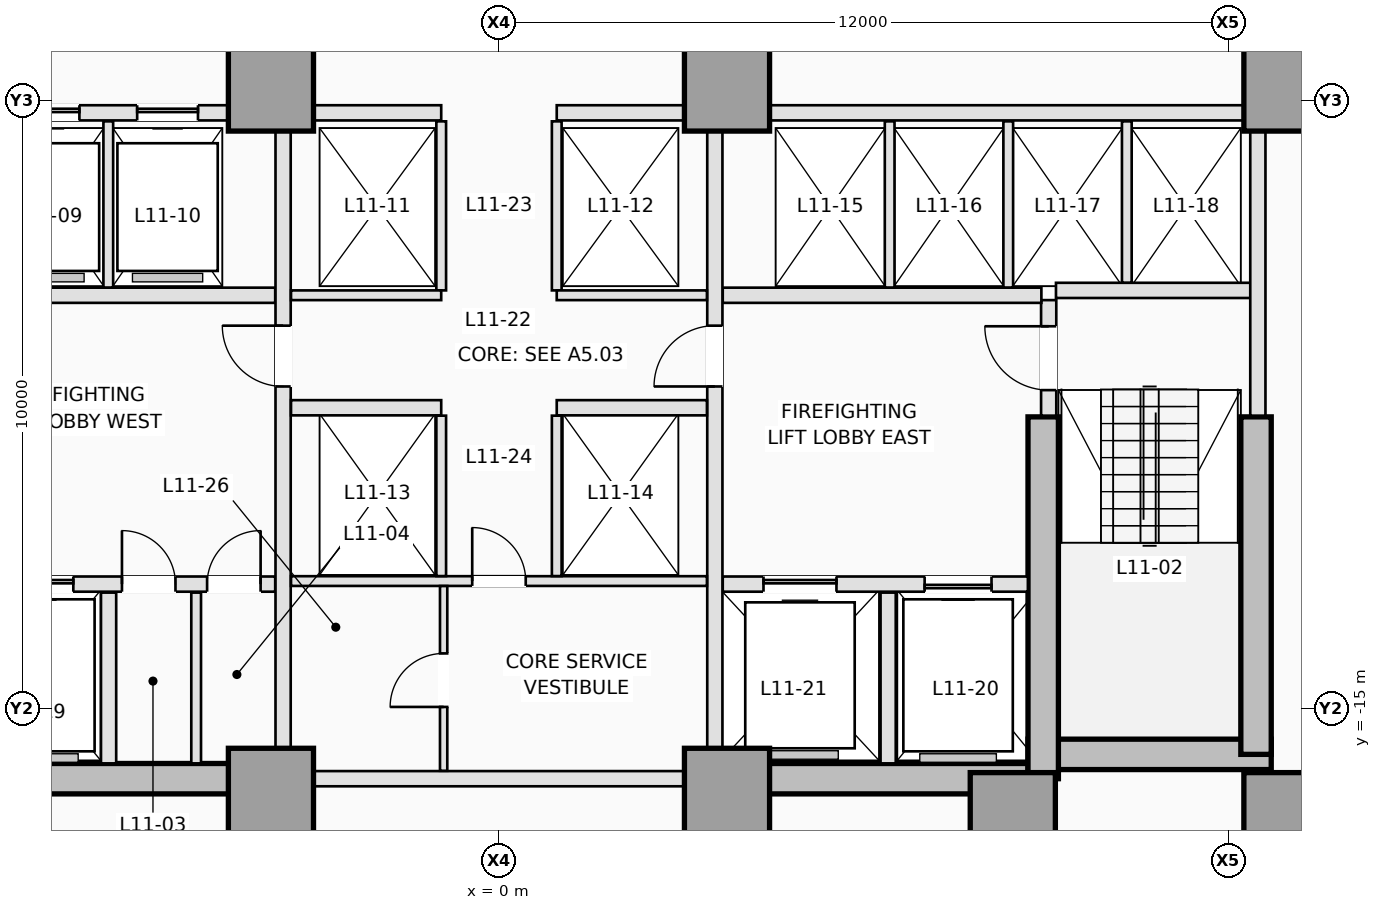
"""IFC4 building model, lengths in metres.
Left out: names, types, materials, properties, quantities, classifications, styles, units other than length and angle.
Written with IfcOpenShell. Run it as: python <this file> out.ifc"""

import sys

from ifc_helpers import new_model, si_unit, direction, frame, frame_2d, origin, origin_2d, place, context, subcontext, project, spatial, rectangle, extrude, element, fill, save


model = new_model("IFC4")
c1 = context("Model", 3, precision=1e-05, world=origin(), true_north=direction((0.0, 1.0)))
c2 = subcontext(c1, "Body", "Model", "MODEL_VIEW")
j1 = project(units=[si_unit("LENGTHUNIT", "METRE"), si_unit("PLANEANGLEUNIT", "RADIAN")], contexts=[c1])
p1 = place(None, origin())
s1 = spatial("IfcSite", under=j1, at=p1, CompositionType="ELEMENT")
p2 = place(p1, origin())
s2 = spatial("IfcBuilding", under=s1, at=p2, CompositionType="ELEMENT")
p3 = place(p2, frame((0.0, 0.0, 45.1)))
s3 = spatial("IfcBuildingStorey", under=s2, at=p3, CompositionType="ELEMENT", Elevation=45.1)
for number, where, z_axis, x_axis in (
    (1, (-8.95, -16.15, 0.0), (0.0, 0.0, 1.0), (1.0, 0.0, 0.0)),
    (2, (3.75, -16.15, 0.0), (0.0, 0.0, 1.0), (1.0, 0.0, 0.0)),
):
    element("IfcWall", number, at=place(p3, frame(where, z_axis=z_axis, x_axis=x_axis)), inside=s3, PredefinedType="SHEAR", context=c2, shape_type="SweptSolid", body=[
        extrude(rectangle(XDim=5.2, YDim=0.5, at=frame_2d((2.6, 0.0))), origin(), (0.0, 0.0, 1.0), 3.5),
    ])
p4 = place(p3, frame((8.7, -15.75, 0.0), z_axis=(0.0, 0.0, 1.0), x_axis=(1.0, 0.0, 0.0)))
e3 = element("IfcWall", 3, at=p4, inside=s3, PredefinedType="SHEAR", context=c2, shape_type="SweptSolid", body=[
    extrude(rectangle(XDim=4.0, YDim=0.5, at=frame_2d((2.0, 0.0))), origin(), (0.0, 0.0, 1.0), 3.5),
])
p5 = place(p3, frame((12.45, -15.75, 0.0), z_axis=(0.0, 0.0, 1.0), x_axis=(0.0, 1.0, 0.0)))
e4 = element("IfcWall", 4, at=p5, inside=s3, PredefinedType="SHEAR", context=c2, shape_type="SweptSolid", body=[
    extrude(rectangle(XDim=5.55, YDim=0.5, at=frame_2d((2.775, 0.0))), origin(), (0.0, 0.0, 1.0), 3.5),
])
p6 = place(p3, frame((8.95, -16.15, 0.0), z_axis=(0.0, 0.0, 1.0), x_axis=(0.0, 1.0, 0.0)))
e5 = element("IfcWall", 5, at=p6, inside=s3, PredefinedType="SHEAR", context=c2, shape_type="SweptSolid", body=[
    extrude(rectangle(XDim=5.95, YDim=0.5, at=frame_2d((2.975, 0.0))), origin(), (0.0, 0.0, 1.0), 3.5),
])
for number, where, z_axis, x_axis in (
    (6, (-3.75, -16.35, 0.0), (0.0, 0.0, 1.0), (1.0, 0.0, 0.0)),
    (7, (3.75, -16.35, 0.0), (0.0, 0.0, 1.0), (1.0, 0.0, 0.0)),
    (8, (8.45, -16.75, 0.0), (0.0, 0.0, 1.0), (1.0, 0.0, 0.0)),
    (9, (12.95, -16.75, 0.0), (0.0, 0.0, 1.0), (1.0, 0.0, 0.0)),
    (10, (-3.75, -4.8, 0.0), (0.0, 0.0, 1.0), (1.0, 0.0, 0.0)),
    (11, (3.75, -4.8, 0.0), (0.0, 0.0, 1.0), (1.0, 0.0, 0.0)),
    (12, (12.95, -4.8, 0.0), (0.0, 0.0, 1.0), (1.0, 0.0, 0.0)),
):
    element("IfcColumn", number, at=place(p3, frame(where, z_axis=z_axis, x_axis=x_axis)), inside=s3, PredefinedType="COLUMN", context=c2, shape_type="SweptSolid", body=[
        extrude(rectangle(XDim=1.4, YDim=1.4, at=origin_2d()), origin(), (0.0, 0.0, 1.0), 3.5),
    ])
p7 = place(p3, frame((9.04, -10.18, 0.0), z_axis=(0.0, 0.0, 1.0), x_axis=(0.0, 1.0, 0.0)))
e13 = element("IfcWall", 13, at=p7, inside=s3, PredefinedType="PARTITIONING", context=c2, shape_type="SweptSolid", body=[
    extrude(rectangle(XDim=1.9, YDim=0.25, at=frame_2d((0.95, 0.0))), origin(), (0.0, 0.0, 1.0), 3.25),
])
p8 = place(p7, frame((0.42, 0.0, 0.0)))
e14 = element("IfcOpeningElement", 14, at=p8, cuts=e13, PredefinedType="OPENING", context=c2, shape_type="SweptSolid", body=[
    extrude(rectangle(XDim=1.05, YDim=2.15, at=frame_2d((0.525, 1.075))), frame((0.0, 0.135, 0.0), z_axis=(0.0, -1.0, 0.0), x_axis=(1.0, 0.0, 0.0)), (0.0, 0.0, 1.0), 0.27),
])
p9 = place(p3, frame((9.16, -8.12, 0.0), z_axis=(0.0, 0.0, 1.0), x_axis=(1.0, 0.0, 0.0)))
e15 = element("IfcWall", 15, at=p9, inside=s3, PredefinedType="PARTITIONING", context=c2, shape_type="SweptSolid", body=[
    extrude(rectangle(XDim=3.22, YDim=0.25, at=frame_2d((1.61, 0.0))), origin(), (0.0, 0.0, 1.0), 3.25),
])
p10 = place(p3, frame((12.48, -10.18, 0.0), z_axis=(0.0, 0.0, 1.0), x_axis=(0.0, 1.0, 0.0)))
e16 = element("IfcWall", 16, at=p10, inside=s3, PredefinedType="PARTITIONING", context=c2, shape_type="SweptSolid", body=[
    extrude(rectangle(XDim=4.678, YDim=0.25, at=frame_2d((2.339, 0.0))), origin(), (0.0, 0.0, 1.0), 3.25),
])
p11 = place(p3, frame((-8.698, -12.95, 0.0), z_axis=(0.0, 0.0, 1.0), x_axis=(1.0, 0.0, 0.0)))
e17 = element("IfcWall", 17, at=p11, inside=s3, PredefinedType="PARTITIONING", context=c2, shape_type="SweptSolid", body=[
    extrude(rectangle(XDim=5.018, YDim=0.25, at=frame_2d((2.509, 0.0))), origin(), (0.0, 0.0, 1.0), 3.25),
])
p12 = place(p11, frame((0.598, 0.0, 0.0)))
e18 = element("IfcOpeningElement", 18, at=p12, cuts=e17, PredefinedType="OPENING", context=c2, shape_type="SweptSolid", body=[
    extrude(rectangle(XDim=1.1, YDim=2.15, at=frame_2d((0.55, 1.075))), frame((0.0, 0.135, 0.0), z_axis=(0.0, -1.0, 0.0), x_axis=(1.0, 0.0, 0.0)), (0.0, 0.0, 1.0), 0.27),
])
p13 = place(p11, frame((2.498, 0.0, 0.0)))
e19 = element("IfcOpeningElement", 19, at=p13, cuts=e17, PredefinedType="OPENING", context=c2, shape_type="SweptSolid", body=[
    extrude(rectangle(XDim=0.88, YDim=2.1, at=frame_2d((0.44, 1.05))), frame((0.0, 0.135, 0.0), z_axis=(0.0, -1.0, 0.0), x_axis=(1.0, 0.0, 0.0)), (0.0, 0.0, 1.0), 0.27),
])
p14 = place(p11, frame((3.898, 0.0, 0.0)))
e20 = element("IfcOpeningElement", 20, at=p14, cuts=e17, PredefinedType="OPENING", context=c2, shape_type="SweptSolid", body=[
    extrude(rectangle(XDim=0.88, YDim=2.1, at=frame_2d((0.44, 1.05))), frame((0.0, 0.135, 0.0), z_axis=(0.0, -1.0, 0.0), x_axis=(1.0, 0.0, 0.0)), (0.0, 0.0, 1.0), 0.27),
])
p15 = place(p3, frame((3.68, -12.95, 0.0), z_axis=(0.0, 0.0, 1.0), x_axis=(1.0, 0.0, 0.0)))
e21 = element("IfcWall", 21, at=p15, inside=s3, PredefinedType="PARTITIONING", context=c2, shape_type="SweptSolid", body=[
    extrude(rectangle(XDim=5.018, YDim=0.25, at=frame_2d((2.509, 0.0))), origin(), (0.0, 0.0, 1.0), 3.25),
])
p16 = place(p15, frame((3.32, 0.0, 0.0)))
e22 = element("IfcOpeningElement", 22, at=p16, cuts=e21, PredefinedType="OPENING", context=c2, shape_type="SweptSolid", body=[
    extrude(rectangle(XDim=1.1, YDim=2.15, at=frame_2d((0.55, 1.075))), frame((0.0, 0.135, 0.0), z_axis=(0.0, -1.0, 0.0), x_axis=(1.0, 0.0, 0.0)), (0.0, 0.0, 1.0), 0.27),
])
p17 = place(p15, frame((0.67, 0.0, 0.0)))
e23 = element("IfcOpeningElement", 23, at=p17, cuts=e21, PredefinedType="OPENING", context=c2, shape_type="SweptSolid", body=[
    extrude(rectangle(XDim=1.2, YDim=2.15, at=frame_2d((0.6, 1.075))), frame((0.0, 0.135, 0.0), z_axis=(0.0, -1.0, 0.0), x_axis=(1.0, 0.0, 0.0)), (0.0, 0.0, 1.0), 0.27),
])
p18 = place(p3, frame((-6.42, -15.898, 0.0), z_axis=(0.0, 0.0, 1.0), x_axis=(0.0, 1.0, 0.0)))
e24 = element("IfcWall", 24, at=p18, inside=s3, PredefinedType="PARTITIONING", context=c2, shape_type="SweptSolid", body=[
    extrude(rectangle(XDim=2.808, YDim=0.25, at=frame_2d((1.404, 0.0))), origin(), (0.0, 0.0, 1.0), 3.25),
])
p19 = place(p3, frame((-4.98, -15.898, 0.0), z_axis=(0.0, 0.0, 1.0), x_axis=(0.0, 1.0, 0.0)))
e25 = element("IfcWall", 25, at=p19, inside=s3, PredefinedType="PARTITIONING", context=c2, shape_type="SweptSolid", body=[
    extrude(rectangle(XDim=2.808, YDim=0.16, at=frame_2d((1.404, 0.0))), origin(), (0.0, 0.0, 1.0), 3.25),
])
p20 = place(p3, frame((6.4, -15.898, 0.0), z_axis=(0.0, 0.0, 1.0), x_axis=(0.0, 1.0, 0.0)))
e26 = element("IfcWall", 26, at=p20, inside=s3, PredefinedType="PARTITIONING", context=c2, shape_type="SweptSolid", body=[
    extrude(rectangle(XDim=2.808, YDim=0.25, at=frame_2d((1.404, 0.0))), origin(), (0.0, 0.0, 1.0), 3.25),
])
for number, where, z_axis, x_axis in (
    (27, (-8.92, -8.2, 0.0), (0.0, 0.0, 1.0), (1.0, 0.0, 0.0)),
    (28, (3.68, -8.2, 0.0), (0.0, 0.0, 1.0), (1.0, 0.0, 0.0)),
):
    element("IfcWall", number, at=place(p3, frame(where, z_axis=z_axis, x_axis=x_axis)), inside=s3, PredefinedType="PARTITIONING", context=c2, shape_type="SweptSolid", body=[
        extrude(rectangle(XDim=5.24, YDim=0.25, at=frame_2d((2.62, 0.0))), origin(), (0.0, 0.0, 1.0), 3.25),
    ])
p21 = place(p3, frame((-3.55, -15.648, 0.0), z_axis=(0.0, 0.0, 1.0), x_axis=(0.0, 1.0, 0.0)))
e29 = element("IfcWall", 29, at=p21, inside=s3, PredefinedType="PARTITIONING", context=c2, shape_type="SweptSolid", body=[
    extrude(rectangle(XDim=10.146, YDim=0.25, at=frame_2d((5.073, 0.0))), origin(), (0.0, 0.0, 1.0), 3.25),
])
p22 = place(p21, frame((5.948, 0.0, 0.0)))
e30 = element("IfcOpeningElement", 30, at=p22, cuts=e29, PredefinedType="OPENING", context=c2, shape_type="SweptSolid", body=[
    extrude(rectangle(XDim=1.0, YDim=2.15, at=frame_2d((0.5, 1.075))), frame((0.0, 0.135, 0.0), z_axis=(0.0, -1.0, 0.0), x_axis=(1.0, 0.0, 0.0)), (0.0, 0.0, 1.0), 0.27),
])
p23 = place(p3, frame((3.55, -15.648, 0.0), z_axis=(0.0, 0.0, 1.0), x_axis=(0.0, 1.0, 0.0)))
e31 = element("IfcWall", 31, at=p23, inside=s3, PredefinedType="PARTITIONING", context=c2, shape_type="SweptSolid", body=[
    extrude(rectangle(XDim=10.146, YDim=0.25, at=frame_2d((5.073, 0.0))), origin(), (0.0, 0.0, 1.0), 3.25),
])
p24 = place(p23, frame((5.948, 0.0, 0.0)))
e32 = element("IfcOpeningElement", 32, at=p24, cuts=e31, PredefinedType="OPENING", context=c2, shape_type="SweptSolid", body=[
    extrude(rectangle(XDim=1.0, YDim=2.15, at=frame_2d((0.5, 1.075))), frame((0.0, 0.135, 0.0), z_axis=(0.0, -1.0, 0.0), x_axis=(1.0, 0.0, 0.0)), (0.0, 0.0, 1.0), 0.27),
])
p25 = place(p3, frame((-12.248, -5.2, 0.0), z_axis=(0.0, 0.0, 1.0), x_axis=(1.0, 0.0, 0.0)))
e33 = element("IfcWall", 33, at=p25, inside=s3, PredefinedType="PARTITIONING", context=c2, shape_type="SweptSolid", body=[
    extrude(rectangle(XDim=7.796, YDim=0.25, at=frame_2d((3.898, 0.0))), origin(), (0.0, 0.0, 1.0), 3.25),
])
p26 = place(p25, frame((0.448, 0.0, 0.0)))
e34 = element("IfcOpeningElement", 34, at=p26, cuts=e33, PredefinedType="OPENING", context=c2, shape_type="SweptSolid", body=[
    extrude(rectangle(XDim=1.0, YDim=2.15, at=frame_2d((0.5, 1.075))), frame((0.0, 0.135, 0.0), z_axis=(0.0, -1.0, 0.0), x_axis=(1.0, 0.0, 0.0)), (0.0, 0.0, 1.0), 0.27),
])
p27 = place(p25, frame((2.398, 0.0, 0.0)))
e35 = element("IfcOpeningElement", 35, at=p27, cuts=e33, PredefinedType="OPENING", context=c2, shape_type="SweptSolid", body=[
    extrude(rectangle(XDim=1.0, YDim=2.15, at=frame_2d((0.5, 1.075))), frame((0.0, 0.135, 0.0), z_axis=(0.0, -1.0, 0.0), x_axis=(1.0, 0.0, 0.0)), (0.0, 0.0, 1.0), 0.27),
])
p28 = place(p25, frame((4.348, 0.0, 0.0)))
e36 = element("IfcOpeningElement", 36, at=p28, cuts=e33, PredefinedType="OPENING", context=c2, shape_type="SweptSolid", body=[
    extrude(rectangle(XDim=1.0, YDim=2.15, at=frame_2d((0.5, 1.075))), frame((0.0, 0.135, 0.0), z_axis=(0.0, -1.0, 0.0), x_axis=(1.0, 0.0, 0.0)), (0.0, 0.0, 1.0), 0.27),
])
p29 = place(p25, frame((6.298, 0.0, 0.0)))
e37 = element("IfcOpeningElement", 37, at=p29, cuts=e33, PredefinedType="OPENING", context=c2, shape_type="SweptSolid", body=[
    extrude(rectangle(XDim=1.0, YDim=2.15, at=frame_2d((0.5, 1.075))), frame((0.0, 0.135, 0.0), z_axis=(0.0, -1.0, 0.0), x_axis=(1.0, 0.0, 0.0)), (0.0, 0.0, 1.0), 0.27),
])
p30 = place(p3, frame((4.452, -5.2, 0.0), z_axis=(0.0, 0.0, 1.0), x_axis=(1.0, 0.0, 0.0)))
e38 = element("IfcWall", 38, at=p30, inside=s3, PredefinedType="PARTITIONING", context=c2, shape_type="SweptSolid", body=[
    extrude(rectangle(XDim=7.796, YDim=0.25, at=frame_2d((3.898, 0.0))), origin(), (0.0, 0.0, 1.0), 3.25),
])
for number, where, z_axis, x_axis in (
    (39, (-3.048, -5.2, 0.0), (0.0, 0.0, 1.0), (1.0, 0.0, 0.0)),
    (40, (0.95, -5.2, 0.0), (0.0, 0.0, 1.0), (1.0, 0.0, 0.0)),
):
    element("IfcWall", number, at=place(p3, frame(where, z_axis=z_axis, x_axis=x_axis)), inside=s3, PredefinedType="PARTITIONING", context=c2, shape_type="SweptSolid", body=[
        extrude(rectangle(XDim=2.098, YDim=0.25, at=frame_2d((1.049, 0.0))), origin(), (0.0, 0.0, 1.0), 3.25),
    ])
for number, where, z_axis, x_axis in (
    (41, (-6.425, -8.073, 0.0), (0.0, 0.0, 1.0), (0.0, 1.0, 0.0)),
    (42, (6.425, -8.073, 0.0), (0.0, 0.0, 1.0), (0.0, 1.0, 0.0)),
    (43, (8.375, -8.073, 0.0), (0.0, 0.0, 1.0), (0.0, 1.0, 0.0)),
):
    element("IfcWall", number, at=place(p3, frame(where, z_axis=z_axis, x_axis=x_axis)), inside=s3, PredefinedType="PARTITIONING", context=c2, shape_type="SweptSolid", body=[
        extrude(rectangle(XDim=2.733, YDim=0.16, at=frame_2d((1.366, 0.0))), origin(), (0.0, 0.0, 1.0), 3.25),
    ])
p31 = place(p3, frame((10.325, -7.993, 0.0), z_axis=(0.0, 0.0, 1.0), x_axis=(0.0, 1.0, 0.0)))
e44 = element("IfcWall", 44, at=p31, inside=s3, PredefinedType="PARTITIONING", context=c2, shape_type="SweptSolid", body=[
    extrude(rectangle(XDim=2.653, YDim=0.16, at=frame_2d((1.326, 0.0))), origin(), (0.0, 0.0, 1.0), 3.25),
])
p32 = place(p3, frame((-3.048, -16.15, 0.0), z_axis=(0.0, 0.0, 1.0), x_axis=(1.0, 0.0, 0.0)))
e45 = element("IfcWall", 45, at=p32, inside=s3, PredefinedType="PARTITIONING", context=c2, shape_type="SweptSolid", body=[
    extrude(rectangle(XDim=6.096, YDim=0.25, at=frame_2d((3.048, 0.0))), origin(), (0.0, 0.0, 1.0), 2.3),
])
for number, where, z_axis, x_axis in (
    (46, (-0.95, -8.12, 0.0), (0.0, 0.0, 1.0), (0.0, 1.0, 0.0)),
    (47, (0.95, -8.12, 0.0), (0.0, 0.0, 1.0), (0.0, 1.0, 0.0)),
):
    element("IfcWall", number, at=place(p3, frame(where, z_axis=z_axis, x_axis=x_axis)), inside=s3, PredefinedType="PARTITIONING", context=c2, shape_type="SweptSolid", body=[
        extrude(rectangle(XDim=2.78, YDim=0.16, at=frame_2d((1.39, 0.0))), origin(), (0.0, 0.0, 1.0), 3.25),
    ])
for number, where, z_axis, x_axis in (
    (48, (-3.42, -8.2, 0.0), (0.0, 0.0, 1.0), (1.0, 0.0, 0.0)),
    (49, (0.95, -8.2, 0.0), (0.0, 0.0, 1.0), (1.0, 0.0, 0.0)),
):
    element("IfcWall", number, at=place(p3, frame(where, z_axis=z_axis, x_axis=x_axis)), inside=s3, PredefinedType="PARTITIONING", context=c2, shape_type="SweptSolid", body=[
        extrude(rectangle(XDim=2.47, YDim=0.16, at=frame_2d((1.235, 0.0))), origin(), (0.0, 0.0, 1.0), 3.25),
    ])
for number, where, z_axis, x_axis in (
    (50, (-3.42, -10.05, 0.0), (0.0, 0.0, 1.0), (1.0, 0.0, 0.0)),
    (51, (0.95, -10.05, 0.0), (0.0, 0.0, 1.0), (1.0, 0.0, 0.0)),
):
    element("IfcWall", number, at=place(p3, frame(where, z_axis=z_axis, x_axis=x_axis)), inside=s3, PredefinedType="PARTITIONING", context=c2, shape_type="SweptSolid", body=[
        extrude(rectangle(XDim=2.47, YDim=0.25, at=frame_2d((1.235, 0.0))), origin(), (0.0, 0.0, 1.0), 3.25),
    ])
p33 = place(p3, frame((-3.42, -12.9, 0.0), z_axis=(0.0, 0.0, 1.0), x_axis=(1.0, 0.0, 0.0)))
e52 = element("IfcWall", 52, at=p33, inside=s3, PredefinedType="PARTITIONING", context=c2, shape_type="SweptSolid", body=[
    extrude(rectangle(XDim=6.84, YDim=0.16, at=frame_2d((3.42, 0.0))), origin(), (0.0, 0.0, 1.0), 3.25),
])
p34 = place(p33, frame((2.98, 0.0, 0.0)))
e53 = element("IfcOpeningElement", 53, at=p34, cuts=e52, PredefinedType="OPENING", context=c2, shape_type="SweptSolid", body=[
    extrude(rectangle(XDim=0.88, YDim=2.12, at=frame_2d((0.44, 1.06))), frame((0.0, 0.09, 0.0), z_axis=(0.0, -1.0, 0.0), x_axis=(1.0, 0.0, 0.0)), (0.0, 0.0, 1.0), 0.18),
])
for number, where, z_axis, x_axis in (
    (54, (-0.95, -12.818, 0.0), (0.0, 0.0, 1.0), (0.0, 1.0, 0.0)),
    (55, (0.95, -12.818, 0.0), (0.0, 0.0, 1.0), (0.0, 1.0, 0.0)),
):
    element("IfcWall", number, at=place(p3, frame(where, z_axis=z_axis, x_axis=x_axis)), inside=s3, PredefinedType="PARTITIONING", context=c2, shape_type="SweptSolid", body=[
        extrude(rectangle(XDim=2.638, YDim=0.16, at=frame_2d((1.319, 0.0))), origin(), (0.0, 0.0, 1.0), 3.25),
    ])
p35 = place(p3, frame((-0.91, -16.02, 0.0), z_axis=(0.0, 0.0, 1.0), x_axis=(0.0, 1.0, 0.0)))
e56 = element("IfcWall", 56, at=p35, inside=s3, PredefinedType="PARTITIONING", context=c2, shape_type="SweptSolid", body=[
    extrude(rectangle(XDim=3.038, YDim=0.12, at=frame_2d((1.519, 0.0))), origin(), (0.0, 0.0, 1.0), 3.25),
])
p36 = place(p35, frame((1.05, 0.0, 0.0)))
e57 = element("IfcOpeningElement", 57, at=p36, cuts=e56, PredefinedType="OPENING", context=c2, shape_type="SweptSolid", body=[
    extrude(rectangle(XDim=0.88, YDim=2.12, at=frame_2d((0.44, 1.06))), frame((0.0, 0.07, 0.0), z_axis=(0.0, -1.0, 0.0), x_axis=(1.0, 0.0, 0.0)), (0.0, 0.0, 1.0), 0.14),
])
p37 = place(p28, origin())
e58 = element("IfcDoor", 58, at=p37, inside=s3, OperationType="SLIDING_TO_LEFT", PredefinedType="DOOR", context=c2, shape_type="SweptSolid", body=[
    extrude(rectangle(XDim=1.0, YDim=2.15, at=frame_2d((0.5, 1.075))), frame((0.0, 0.025, 0.0), z_axis=(0.0, -1.0, 0.0), x_axis=(1.0, 0.0, 0.0)), (0.0, 0.0, 1.0), 0.05),
])
fill(e36, e58)
p38 = place(p29, origin())
e59 = element("IfcDoor", 59, at=p38, inside=s3, OperationType="SLIDING_TO_LEFT", PredefinedType="DOOR", context=c2, shape_type="SweptSolid", body=[
    extrude(rectangle(XDim=1.0, YDim=2.15, at=frame_2d((0.5, 1.075))), frame((0.0, 0.025, 0.0), z_axis=(0.0, -1.0, 0.0), x_axis=(1.0, 0.0, 0.0)), (0.0, 0.0, 1.0), 0.05),
])
fill(e37, e59)
p39 = place(p12, origin())
e60 = element("IfcDoor", 60, at=p39, inside=s3, OperationType="SLIDING_TO_LEFT", PredefinedType="DOOR", context=c2, shape_type="SweptSolid", body=[
    extrude(rectangle(XDim=1.1, YDim=2.15, at=frame_2d((0.55, 1.075))), frame((0.0, 0.025, 0.0), z_axis=(0.0, -1.0, 0.0), x_axis=(1.0, 0.0, 0.0)), (0.0, 0.0, 1.0), 0.05),
])
fill(e18, e60)
p40 = place(p16, origin())
e61 = element("IfcDoor", 61, at=p40, inside=s3, OperationType="SLIDING_TO_RIGHT", PredefinedType="DOOR", context=c2, shape_type="SweptSolid", body=[
    extrude(rectangle(XDim=1.1, YDim=2.15, at=frame_2d((0.55, 1.075))), frame((0.0, 0.025, 0.0), z_axis=(0.0, -1.0, 0.0), x_axis=(1.0, 0.0, 0.0)), (0.0, 0.0, 1.0), 0.05),
])
fill(e22, e61)
p41 = place(p17, origin())
e62 = element("IfcDoor", 62, at=p41, inside=s3, OperationType="SLIDING_TO_LEFT", PredefinedType="DOOR", context=c2, shape_type="SweptSolid", body=[
    extrude(rectangle(XDim=1.2, YDim=2.15, at=frame_2d((0.6, 1.075))), frame((0.0, 0.025, 0.0), z_axis=(0.0, -1.0, 0.0), x_axis=(1.0, 0.0, 0.0)), (0.0, 0.0, 1.0), 0.05),
])
fill(e23, e62)
p42 = place(p8, origin())
e63 = element("IfcDoor", 63, at=p42, inside=s3, OperationType="SINGLE_SWING_RIGHT", PredefinedType="DOOR", context=c2, shape_type="SweptSolid", body=[
    extrude(rectangle(XDim=1.05, YDim=2.15, at=frame_2d((0.525, 1.075))), frame((0.0, 0.025, 0.0), z_axis=(0.0, -1.0, 0.0), x_axis=(1.0, 0.0, 0.0)), (0.0, 0.0, 1.0), 0.05),
])
fill(e14, e63)
p43 = place(p13, origin())
e64 = element("IfcDoor", 64, at=p43, inside=s3, OperationType="SINGLE_SWING_LEFT", PredefinedType="TRAPDOOR", context=c2, shape_type="SweptSolid", body=[
    extrude(rectangle(XDim=0.88, YDim=2.1, at=frame_2d((0.44, 1.05))), frame((0.0, 0.025, 0.0), z_axis=(0.0, -1.0, 0.0), x_axis=(1.0, 0.0, 0.0)), (0.0, 0.0, 1.0), 0.05),
])
fill(e19, e64)
p44 = place(p14, origin())
e65 = element("IfcDoor", 65, at=p44, inside=s3, OperationType="SINGLE_SWING_RIGHT", PredefinedType="TRAPDOOR", context=c2, shape_type="SweptSolid", body=[
    extrude(rectangle(XDim=0.88, YDim=2.1, at=frame_2d((0.44, 1.05))), frame((0.0, 0.025, 0.0), z_axis=(0.0, -1.0, 0.0), x_axis=(1.0, 0.0, 0.0)), (0.0, 0.0, 1.0), 0.05),
])
fill(e20, e65)
p45 = place(p22, origin())
e66 = element("IfcDoor", 66, at=p45, inside=s3, OperationType="SINGLE_SWING_RIGHT", PredefinedType="DOOR", context=c2, shape_type="SweptSolid", body=[
    extrude(rectangle(XDim=1.0, YDim=2.15, at=frame_2d((0.5, 1.075))), frame((0.0, 0.025, 0.0), z_axis=(0.0, -1.0, 0.0), x_axis=(1.0, 0.0, 0.0)), (0.0, 0.0, 1.0), 0.05),
])
fill(e30, e66)
p46 = place(p24, origin())
e67 = element("IfcDoor", 67, at=p46, inside=s3, OperationType="SINGLE_SWING_LEFT", PredefinedType="DOOR", context=c2, shape_type="SweptSolid", body=[
    extrude(rectangle(XDim=1.0, YDim=2.15, at=frame_2d((0.5, 1.075))), frame((0.0, 0.025, 0.0), z_axis=(0.0, -1.0, 0.0), x_axis=(1.0, 0.0, 0.0)), (0.0, 0.0, 1.0), 0.05),
])
fill(e32, e67)
p47 = place(p34, origin())
e68 = element("IfcDoor", 68, at=p47, inside=s3, OperationType="SINGLE_SWING_LEFT", PredefinedType="DOOR", context=c2, shape_type="SweptSolid", body=[
    extrude(rectangle(XDim=0.88, YDim=2.12, at=frame_2d((0.44, 1.06))), frame((0.0, 0.025, 0.0), z_axis=(0.0, -1.0, 0.0), x_axis=(1.0, 0.0, 0.0)), (0.0, 0.0, 1.0), 0.05),
])
fill(e53, e68)
p48 = place(p36, origin())
e69 = element("IfcDoor", 69, at=p48, inside=s3, OperationType="SINGLE_SWING_LEFT", PredefinedType="DOOR", context=c2, shape_type="SweptSolid", body=[
    extrude(rectangle(XDim=0.88, YDim=2.12, at=frame_2d((0.44, 1.06))), frame((0.0, 0.025, 0.0), z_axis=(0.0, -1.0, 0.0), x_axis=(1.0, 0.0, 0.0)), (0.0, 0.0, 1.0), 0.05),
])
fill(e57, e69)
save(model, sys.argv[1])
